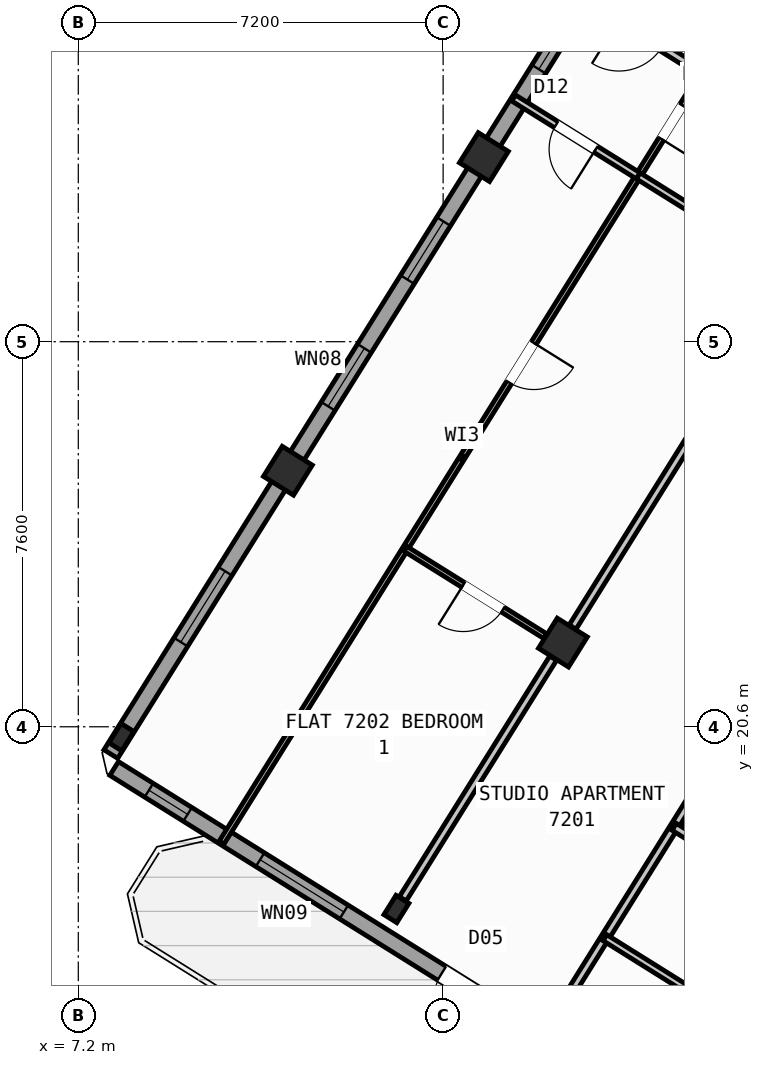
"""IFC4 building model, lengths in metres.
Left out: names, types, materials, properties, quantities, classifications, styles, units other than length and angle.
Written with IfcOpenShell. Run it as: python <this file> out.ifc"""

import sys

from ifc_helpers import new_model, si_unit, direction, frame, frame_2d, origin, origin_2d, place, context, subcontext, project, spatial, rectangle, hollow_rectangle, i_section, extrude, source, transform, mapped, element, fill, save


model = new_model("IFC4")
c1 = context("Model", 3, precision=1e-05, world=origin(), true_north=direction((0.0, 1.0)))
c2 = subcontext(c1, "Body", "Model", "MODEL_VIEW")
j1 = project(units=[si_unit("LENGTHUNIT", "METRE"), si_unit("PLANEANGLEUNIT", "RADIAN")], contexts=[c1])
p1 = place(None, origin())
s1 = spatial("IfcSite", under=j1, at=p1, CompositionType="ELEMENT")
p2 = place(p1, origin())
s2 = spatial("IfcBuilding", under=s1, at=p2, CompositionType="ELEMENT")
p3 = place(p2, frame((0.0, 0.0, 284.4)))
s3 = spatial("IfcBuildingStorey", under=s2, at=p3, CompositionType="ELEMENT", Elevation=284.4)
m1 = source(origin(), c2, "Body", "SweptSolid", [
    extrude(hollow_rectangle(XDim=0.7, YDim=0.7, WallThickness=0.028, at=origin_2d()), origin(), (0.0, 0.0, 1.0), 3.6),
])
p4 = place(p3, frame((16.764, 22.261, 0.0), z_axis=(0.0, 0.0, 1.0), x_axis=(-0.848048096156, 0.529919264233, 0.0)))
e1 = element("IfcColumn", 1, at=p4, inside=s3, PredefinedType="COLUMN", context=c2, shape_type="MappedRepresentation", body=[
    mapped(m1, transform((0.0, 0.0, 0.0), scale=1.0)),
])
m2 = source(origin(), c2, "Body", "SweptSolid", [
    extrude(i_section(OverallWidth=0.3, OverallDepth=0.45, WebThickness=0.014, FlangeThickness=0.026, at=origin_2d()), origin(), (0.0, 0.0, 1.0), 3.6),
])
p5 = place(p3, frame((13.478, 17.003, 0.0), z_axis=(0.0, 0.0, 1.0), x_axis=(-0.848048096156, 0.529919264233, 0.0)))
e2 = element("IfcColumn", 2, at=p5, inside=s3, PredefinedType="COLUMN", context=c2, shape_type="MappedRepresentation", body=[
    mapped(m2, transform((0.0, 0.0, 0.0), scale=1.0)),
])
for number, where, z_axis, x_axis in (
    (3, (15.205, 31.844, 0.0), (0.0, 0.0, 1.0), (-0.848, 0.53, 0.0)),
    (4, (11.336, 25.653, 0.0), (0.0, 0.0, 1.0), (-0.848, 0.53, 0.0)),
):
    element("IfcColumn", number, at=place(p3, frame(where, z_axis=z_axis, x_axis=x_axis)), inside=s3, PredefinedType="COLUMN", context=c2, shape_type="MappedRepresentation", body=[
        mapped(m1, transform((0.0, 0.0, 0.0), scale=1.0)),
    ])
p6 = place(p3, frame((8.051, 20.395, 0.0), z_axis=(0.0, 0.0, 1.0), x_axis=(-0.848048096156, 0.529919264233, 0.0)))
e5 = element("IfcColumn", 5, at=p6, inside=s3, PredefinedType="COLUMN", context=c2, shape_type="MappedRepresentation", body=[
    mapped(m2, transform((0.0, 0.0, 0.0), scale=1.0)),
])
p7 = place(p3, frame((29.268, 6.429, 0.0), z_axis=(0.0, 0.0, 1.0), x_axis=(-0.848048398186, 0.529918780885, 0.0)))
e6 = element("IfcWall", 6, at=p7, inside=s3, PredefinedType="STANDARD", context=c2, shape_type="SweptSolid", body=[
    extrude(rectangle(XDim=25.188, YDim=0.32, at=frame_2d((12.594, 0.0))), origin(), (0.0, 0.0, 1.0), 3.35),
])
p8 = place(p7, frame((16.362, 0.0, 0.0)))
e7 = element("IfcOpeningElement", 7, at=p8, cuts=e6, PredefinedType="OPENING", context=c2, shape_type="SweptSolid", body=[
    extrude(rectangle(XDim=1.2, YDim=2.15, at=frame_2d((0.6, 1.075))), frame((0.0, 0.17, 0.0), z_axis=(0.0, -1.0, 0.0), x_axis=(1.0, 0.0, 0.0)), (0.0, 0.0, 1.0), 0.34),
])
p9 = place(p7, frame((3.859, 0.0, 0.9)))
e8 = element("IfcOpeningElement", 8, at=p9, cuts=e6, PredefinedType="OPENING", context=c2, shape_type="SweptSolid", body=[
    extrude(rectangle(XDim=1.65, YDim=1.45, at=frame_2d((0.825, 0.725))), frame((0.0, 0.17, 0.0), z_axis=(0.0, -1.0, 0.0), x_axis=(1.0, 0.0, 0.0)), (0.0, 0.0, 1.0), 0.34),
])
p10 = place(p7, frame((10.519, 0.0, 0.9)))
e9 = element("IfcOpeningElement", 9, at=p10, cuts=e6, PredefinedType="OPENING", context=c2, shape_type="SweptSolid", body=[
    extrude(rectangle(XDim=1.65, YDim=1.45, at=frame_2d((0.825, 0.725))), frame((0.0, 0.17, 0.0), z_axis=(0.0, -1.0, 0.0), x_axis=(1.0, 0.0, 0.0)), (0.0, 0.0, 1.0), 0.34),
])
p11 = place(p7, frame((19.841, 0.0, 0.95)))
e10 = element("IfcOpeningElement", 10, at=p11, cuts=e6, PredefinedType="OPENING", context=c2, shape_type="SweptSolid", body=[
    extrude(rectangle(XDim=1.95, YDim=1.35, at=frame_2d((0.975, 0.675))), frame((0.0, 0.17, 0.0), z_axis=(0.0, -1.0, 0.0), x_axis=(1.0, 0.0, 0.0)), (0.0, 0.0, 1.0), 0.34),
])
p12 = place(p7, frame((23.478, 0.0, 1.0)))
e11 = element("IfcOpeningElement", 11, at=p12, cuts=e6, PredefinedType="OPENING", context=c2, shape_type="SweptSolid", body=[
    extrude(rectangle(XDim=0.9, YDim=1.25, at=frame_2d((0.45, 0.625))), frame((0.0, 0.17, 0.0), z_axis=(0.0, -1.0, 0.0), x_axis=(1.0, 0.0, 0.0)), (0.0, 0.0, 1.0), 0.34),
])
p13 = place(p3, frame((7.842, 20.061, 0.0), z_axis=(0.0, 0.0, 1.0), x_axis=(0.529915577903, 0.84805039962, 0.0)))
e12 = element("IfcWall", 12, at=p13, inside=s3, PredefinedType="STANDARD", context=c2, shape_type="SweptSolid", body=[
    extrude(rectangle(XDim=21.587, YDim=0.32, at=frame_2d((10.794, 0.0))), origin(), (0.0, 0.0, 1.0), 2.875),
])
p14 = place(p13, frame((2.606, 0.0, 0.9)))
e13 = element("IfcOpeningElement", 13, at=p14, cuts=e12, PredefinedType="OPENING", context=c2, shape_type="SweptSolid", body=[
    extrude(rectangle(XDim=1.65, YDim=1.45, at=frame_2d((0.825, 0.725))), frame((0.0, 0.17, 0.0), z_axis=(0.0, -1.0, 0.0), x_axis=(1.0, 0.0, 0.0)), (0.0, 0.0, 1.0), 0.34),
])
p15 = place(p13, frame((8.094, 0.0, 0.9)))
e14 = element("IfcOpeningElement", 14, at=p15, cuts=e12, PredefinedType="OPENING", context=c2, shape_type="SweptSolid", body=[
    extrude(rectangle(XDim=1.35, YDim=1.45, at=frame_2d((0.675, 0.725))), frame((0.0, 0.17, 0.0), z_axis=(0.0, -1.0, 0.0), x_axis=(1.0, 0.0, 0.0)), (0.0, 0.0, 1.0), 0.34),
])
p16 = place(p13, frame((11.044, 0.0, 0.9)))
e15 = element("IfcOpeningElement", 15, at=p16, cuts=e12, PredefinedType="OPENING", context=c2, shape_type="SweptSolid", body=[
    extrude(rectangle(XDim=1.35, YDim=1.45, at=frame_2d((0.675, 0.725))), frame((0.0, 0.17, 0.0), z_axis=(0.0, -1.0, 0.0), x_axis=(1.0, 0.0, 0.0)), (0.0, 0.0, 1.0), 0.34),
])
p17 = place(p13, frame((15.939, 0.0, 1.0)))
e16 = element("IfcOpeningElement", 16, at=p17, cuts=e12, PredefinedType="OPENING", context=c2, shape_type="SweptSolid", body=[
    extrude(rectangle(XDim=0.9, YDim=1.25, at=frame_2d((0.45, 0.625))), frame((0.0, 0.17, 0.0), z_axis=(0.0, -1.0, 0.0), x_axis=(1.0, 0.0, 0.0)), (0.0, 0.0, 1.0), 0.34),
])
p18 = place(p3, frame((21.206, 17.292, 0.0), z_axis=(0.0, 0.0, 1.0), x_axis=(-0.848050851465, 0.529914854792, 0.0)))
e17 = element("IfcWall", 17, at=p18, inside=s3, PredefinedType="PARTITIONING", context=c2, shape_type="SweptSolid", body=[
    extrude(rectangle(XDim=2.61, YDim=0.16, at=frame_2d((1.305, 0.0))), origin(), (0.0, 0.0, 1.0), 3.34),
])
p19 = place(p3, frame((25.807, 29.582, 0.0), z_axis=(0.0, 0.0, 1.0), x_axis=(-0.529918119251, -0.84804881162, 0.0)))
e18 = element("IfcWall", 18, at=p19, inside=s3, PredefinedType="PARTITIONING", context=c2, shape_type="SweptSolid", body=[
    extrude(rectangle(XDim=17.65, YDim=0.16, at=frame_2d((8.825, 0.0))), origin(), (0.0, 0.0, 1.0), 3.34),
])
p20 = place(p3, frame((26.973, 31.447, 0.0), z_axis=(0.0, 0.0, 1.0), x_axis=(-0.84805406617, 0.529909710094, 0.0)))
e19 = element("IfcWall", 19, at=p20, inside=s3, PredefinedType="PARTITIONING", context=c2, shape_type="SweptSolid", body=[
    extrude(rectangle(XDim=10.33, YDim=0.16, at=frame_2d((5.165, 0.0))), origin(), (0.0, 0.0, 1.0), 3.34),
])
p21 = place(p20, frame((1.459, 0.0, 0.0)))
e20 = element("IfcOpeningElement", 20, at=p21, cuts=e19, PredefinedType="OPENING", context=c2, shape_type="SweptSolid", body=[
    extrude(rectangle(XDim=1.0, YDim=2.1, at=frame_2d((0.5, 1.05))), frame((0.0, 0.09, 0.0), z_axis=(0.0, -1.0, 0.0), x_axis=(1.0, 0.0, 0.0)), (0.0, 0.0, 1.0), 0.18),
])
p22 = place(p20, frame((6.614, 0.0, 0.0)))
e21 = element("IfcOpeningElement", 21, at=p22, cuts=e19, PredefinedType="OPENING", context=c2, shape_type="SweptSolid", body=[
    extrude(rectangle(XDim=1.0, YDim=2.1, at=frame_2d((0.5, 1.05))), frame((0.0, 0.09, 0.0), z_axis=(0.0, -1.0, 0.0), x_axis=(1.0, 0.0, 0.0)), (0.0, 0.0, 1.0), 0.18),
])
p23 = place(p3, frame((25.807, 29.582, 0.0), z_axis=(0.0, 0.0, 1.0), x_axis=(-0.848060702647, 0.529899089097, 0.0)))
e22 = element("IfcWall", 22, at=p23, inside=s3, PredefinedType="PARTITIONING", context=c2, shape_type="SweptSolid", body=[
    extrude(rectangle(XDim=10.33, YDim=0.16, at=frame_2d((5.165, 0.0))), origin(), (0.0, 0.0, 1.0), 3.34),
])
p24 = place(p23, frame((2.22, 0.0, 0.0)))
e23 = element("IfcOpeningElement", 23, at=p24, cuts=e22, PredefinedType="OPENING", context=c2, shape_type="SweptSolid", body=[
    extrude(rectangle(XDim=0.86, YDim=2.05, at=frame_2d((0.43, 1.025))), frame((0.0, 0.09, 0.0), z_axis=(0.0, -1.0, 0.0), x_axis=(1.0, 0.0, 0.0)), (0.0, 0.0, 1.0), 0.18),
])
p25 = place(p23, frame((8.36, 0.0, 0.0)))
e24 = element("IfcOpeningElement", 24, at=p25, cuts=e22, PredefinedType="OPENING", context=c2, shape_type="SweptSolid", body=[
    extrude(rectangle(XDim=1.0, YDim=2.1, at=frame_2d((0.5, 1.05))), frame((0.0, 0.09, 0.0), z_axis=(0.0, -1.0, 0.0), x_axis=(1.0, 0.0, 0.0)), (0.0, 0.0, 1.0), 0.18),
])
p26 = place(p3, frame((20.44, 28.145, 0.0), z_axis=(0.0, 0.0, 1.0), x_axis=(-0.529938869374, -0.84803584519, 0.0)))
e25 = element("IfcWall", 25, at=p26, inside=s3, PredefinedType="PARTITIONING", context=c2, shape_type="SweptSolid", body=[
    extrude(rectangle(XDim=6.576, YDim=0.16, at=frame_2d((3.288, 0.0))), origin(), (0.0, 0.0, 1.0), 2.875),
])
p27 = place(p3, frame((16.572, 21.954, 0.0), z_axis=(0.0, 0.0, 1.0), x_axis=(-0.529904903214, -0.848057069748, 0.0)))
e26 = element("IfcWall", 26, at=p27, inside=s3, PredefinedType="PARTITIONING", context=c2, shape_type="SweptSolid", body=[
    extrude(rectangle(XDim=5.601, YDim=0.16, at=frame_2d((2.801, 0.0))), origin(), (0.0, 0.0, 1.0), 2.875),
])
p28 = place(p3, frame((19.523, 33.508, 0.0), z_axis=(0.0, 0.0, 1.0), x_axis=(-0.529910765222, -0.848053406869, 0.0)))
e27 = element("IfcWall", 27, at=p28, inside=s3, PredefinedType="PARTITIONING", context=c2, shape_type="SweptSolid", body=[
    extrude(rectangle(XDim=17.92, YDim=0.11, at=frame_2d((8.96, 0.0))), origin(), (0.0, 0.0, 1.0), 3.34),
])
p29 = place(p28, frame((0.76, 0.0, 0.0)))
e28 = element("IfcOpeningElement", 28, at=p29, cuts=e27, PredefinedType="OPENING", context=c2, shape_type="SweptSolid", body=[
    extrude(rectangle(XDim=0.78, YDim=2.05, at=frame_2d((0.39, 1.025))), frame((0.0, 0.065, 0.0), z_axis=(0.0, -1.0, 0.0), x_axis=(1.0, 0.0, 0.0)), (0.0, 0.0, 1.0), 0.13),
])
p30 = place(p28, frame((6.289, 0.0, 0.0)))
e29 = element("IfcOpeningElement", 29, at=p30, cuts=e27, PredefinedType="OPENING", context=c2, shape_type="SweptSolid", body=[
    extrude(rectangle(XDim=0.92, YDim=2.08, at=frame_2d((0.46, 1.04))), frame((0.0, 0.065, 0.0), z_axis=(0.0, -1.0, 0.0), x_axis=(1.0, 0.0, 0.0)), (0.0, 0.0, 1.0), 0.13),
])
p31 = place(p3, frame((18.251, 31.473, 0.0), z_axis=(0.0, 0.0, 1.0), x_axis=(-0.848059786386, 0.529900555496, 0.0)))
e30 = element("IfcWall", 30, at=p31, inside=s3, PredefinedType="PLUMBINGWALL", context=c2, shape_type="SweptSolid", body=[
    extrude(rectangle(XDim=2.9, YDim=0.14, at=frame_2d((1.45, 0.0))), origin(), (0.0, 0.0, 1.0), 3.34),
])
p32 = place(p31, frame((0.99, 0.0, 0.0)))
e31 = element("IfcOpeningElement", 31, at=p32, cuts=e30, PredefinedType="OPENING", context=c2, shape_type="SweptSolid", body=[
    extrude(rectangle(XDim=0.92, YDim=2.08, at=frame_2d((0.46, 1.04))), frame((0.0, 0.08, 0.0), z_axis=(0.0, -1.0, 0.0), x_axis=(1.0, 0.0, 0.0)), (0.0, 0.0, 1.0), 0.16),
])
p33 = place(p3, frame((21.321, 29.554, 0.0), z_axis=(0.0, 0.0, 1.0), x_axis=(-0.848021036626, 0.529962566074, 0.0)))
e32 = element("IfcWall", 32, at=p33, inside=s3, PredefinedType="PLUMBINGWALL", context=c2, shape_type="SweptSolid", body=[
    extrude(rectangle(XDim=3.62, YDim=0.14, at=frame_2d((1.81, 0.0))), origin(), (0.0, 0.0, 1.0), 3.34),
])
p34 = place(p3, frame((16.416, 22.388, 0.0), z_axis=(0.0, 0.0, 1.0), x_axis=(-0.84806986598, 0.529884423641, 0.0)))
e33 = element("IfcWall", 33, at=p34, inside=s3, PredefinedType="PARTITIONING", context=c2, shape_type="SweptSolid", body=[
    extrude(rectangle(XDim=3.258, YDim=0.11, at=frame_2d((1.629, 0.0))), origin(), (0.0, 0.0, 1.0), 2.875),
])
p35 = place(p34, frame((0.988, 0.0, 0.0)))
e34 = element("IfcOpeningElement", 34, at=p35, cuts=e33, PredefinedType="OPENING", context=c2, shape_type="SweptSolid", body=[
    extrude(rectangle(XDim=0.92, YDim=2.08, at=frame_2d((0.46, 1.04))), frame((0.0, 0.065, 0.0), z_axis=(0.0, -1.0, 0.0), x_axis=(1.0, 0.0, 0.0)), (0.0, 0.0, 1.0), 0.13),
])
p36 = place(p3, frame((32.164, 10.374, 0.0), z_axis=(0.0, 0.0, 1.0), x_axis=(-0.848044107957, 0.529925646633, 0.0)))
e35 = element("IfcWall", 35, at=p36, inside=s3, PredefinedType="PARTITIONING", context=c2, shape_type="SweptSolid", body=[
    extrude(rectangle(XDim=15.57, YDim=0.16, at=frame_2d((7.785, 0.0))), origin(), (0.0, 0.0, 1.0), 3.34),
])
p37 = place(p36, frame((10.83, 0.0, 0.0)))
e36 = element("IfcOpeningElement", 36, at=p37, cuts=e35, PredefinedType="OPENING", context=c2, shape_type="SweptSolid", body=[
    extrude(rectangle(XDim=1.0, YDim=2.1, at=frame_2d((0.5, 1.05))), frame((0.0, 0.09, 0.0), z_axis=(0.0, -1.0, 0.0), x_axis=(1.0, 0.0, 0.0)), (0.0, 0.0, 1.0), 0.18),
])
p38 = place(p3, frame((29.72, 8.859, 0.0), z_axis=(0.0, 0.0, 1.0), x_axis=(-0.848049134363, 0.529917602752, 0.0)))
e37 = element("IfcWall", 37, at=p38, inside=s3, PredefinedType="PLUMBINGWALL", context=c2, shape_type="SweptSolid", body=[
    extrude(rectangle(XDim=14.3, YDim=0.14, at=frame_2d((7.15, 0.0))), origin(), (0.0, 0.0, 1.0), 3.34),
])
p39 = place(p38, frame((9.57, 0.0, 0.0)))
e38 = element("IfcOpeningElement", 38, at=p39, cuts=e37, PredefinedType="OPENING", context=c2, shape_type="SweptSolid", body=[
    extrude(rectangle(XDim=0.92, YDim=2.08, at=frame_2d((0.46, 1.04))), frame((0.0, 0.08, 0.0), z_axis=(0.0, -1.0, 0.0), x_axis=(1.0, 0.0, 0.0)), (0.0, 0.0, 1.0), 0.16),
])
m3 = source(origin(), c2, "Body", "SweptSolid", [
    extrude(rectangle(XDim=1.2, YDim=2.15, at=frame_2d((0.6, 1.075))), frame((0.0, 0.025, 0.0), z_axis=(0.0, -1.0, 0.0), x_axis=(1.0, 0.0, 0.0)), (0.0, 0.0, 1.0), 0.05),
])
p40 = place(p8, origin())
e39 = element("IfcDoor", 39, at=p40, inside=s3, OperationType="SINGLE_SWING_LEFT", PredefinedType="DOOR", context=c2, shape_type="MappedRepresentation", body=[
    mapped(m3, transform((0.0, 0.0, 0.0), scale=1.0)),
])
fill(e7, e39)
m4 = source(origin(), c2, "Body", "SweptSolid", [
    extrude(rectangle(XDim=1.95, YDim=1.35, at=frame_2d((0.975, 0.675))), frame((0.0, 0.03, 0.0), z_axis=(0.0, -1.0, 0.0), x_axis=(1.0, 0.0, 0.0)), (0.0, 0.0, 1.0), 0.06),
])
p41 = place(p11, origin())
e40 = element("IfcWindow", 40, at=p41, inside=s3, PartitioningType="SINGLE_PANEL", PredefinedType="WINDOW", context=c2, shape_type="MappedRepresentation", body=[
    mapped(m4, transform((0.0, 0.0, 0.0), scale=1.0)),
])
fill(e10, e40)
m5 = source(origin(), c2, "Body", "SweptSolid", [
    extrude(rectangle(XDim=0.9, YDim=1.25, at=frame_2d((0.45, 0.625))), frame((0.0, 0.03, 0.0), z_axis=(0.0, -1.0, 0.0), x_axis=(1.0, 0.0, 0.0)), (0.0, 0.0, 1.0), 0.06),
])
p42 = place(p12, origin())
e41 = element("IfcWindow", 41, at=p42, inside=s3, PartitioningType="SINGLE_PANEL", PredefinedType="WINDOW", context=c2, shape_type="MappedRepresentation", body=[
    mapped(m5, transform((0.0, 0.0, 0.0), scale=1.0)),
])
fill(e11, e41)
m6 = source(origin(), c2, "Body", "SweptSolid", [
    extrude(rectangle(XDim=1.65, YDim=1.45, at=frame_2d((0.825, 0.725))), frame((0.0, 0.03, 0.0), z_axis=(0.0, -1.0, 0.0), x_axis=(1.0, 0.0, 0.0)), (0.0, 0.0, 1.0), 0.06),
])
p43 = place(p14, origin())
e42 = element("IfcWindow", 42, at=p43, inside=s3, PartitioningType="SINGLE_PANEL", PredefinedType="WINDOW", context=c2, shape_type="MappedRepresentation", body=[
    mapped(m6, transform((0.0, 0.0, 0.0), scale=1.0)),
])
fill(e13, e42)
m7 = source(origin(), c2, "Body", "SweptSolid", [
    extrude(rectangle(XDim=1.35, YDim=1.45, at=frame_2d((0.675, 0.725))), frame((0.0, 0.03, 0.0), z_axis=(0.0, -1.0, 0.0), x_axis=(1.0, 0.0, 0.0)), (0.0, 0.0, 1.0), 0.06),
])
p44 = place(p15, origin())
e43 = element("IfcWindow", 43, at=p44, inside=s3, PartitioningType="SINGLE_PANEL", PredefinedType="WINDOW", context=c2, shape_type="MappedRepresentation", body=[
    mapped(m7, transform((0.0, 0.0, 0.0), scale=1.0)),
])
fill(e14, e43)
p45 = place(p16, origin())
e44 = element("IfcWindow", 44, at=p45, inside=s3, PartitioningType="SINGLE_PANEL", PredefinedType="WINDOW", context=c2, shape_type="MappedRepresentation", body=[
    mapped(m7, transform((0.0, 0.0, 0.0), scale=1.0)),
])
fill(e15, e44)
p46 = place(p17, origin())
e45 = element("IfcWindow", 45, at=p46, inside=s3, PartitioningType="SINGLE_PANEL", PredefinedType="WINDOW", context=c2, shape_type="MappedRepresentation", body=[
    mapped(m5, transform((0.0, 0.0, 0.0), scale=1.0)),
])
fill(e16, e45)
m8 = source(origin(), c2, "Body", "SweptSolid", [
    extrude(rectangle(XDim=0.92, YDim=2.08, at=frame_2d((0.46, 1.04))), frame((0.0, 0.025, 0.0), z_axis=(0.0, -1.0, 0.0), x_axis=(1.0, 0.0, 0.0)), (0.0, 0.0, 1.0), 0.05),
])
p47 = place(p32, origin())
e46 = element("IfcDoor", 46, at=p47, inside=s3, OperationType="SINGLE_SWING_LEFT", PredefinedType="DOOR", context=c2, shape_type="MappedRepresentation", body=[
    mapped(m8, transform((0.0, 0.0, 0.0), scale=1.0)),
])
fill(e31, e46)
m9 = source(origin(), c2, "Body", "SweptSolid", [
    extrude(rectangle(XDim=0.78, YDim=2.05, at=frame_2d((0.39, 1.025))), frame((0.0, 0.025, 0.0), z_axis=(0.0, -1.0, 0.0), x_axis=(1.0, 0.0, 0.0)), (0.0, 0.0, 1.0), 0.05),
])
p48 = place(p29, origin())
e47 = element("IfcDoor", 47, at=p48, inside=s3, OperationType="SINGLE_SWING_RIGHT", PredefinedType="DOOR", context=c2, shape_type="MappedRepresentation", body=[
    mapped(m9, transform((0.0, 0.0, 0.0), scale=1.0)),
])
fill(e28, e47)
p49 = place(p30, origin())
e48 = element("IfcDoor", 48, at=p49, inside=s3, OperationType="SINGLE_SWING_LEFT", PredefinedType="DOOR", context=c2, shape_type="MappedRepresentation", body=[
    mapped(m8, transform((0.0, 0.0, 0.0), scale=1.0)),
])
fill(e29, e48)
p50 = place(p35, origin())
e49 = element("IfcDoor", 49, at=p50, inside=s3, OperationType="SINGLE_SWING_RIGHT", PredefinedType="DOOR", context=c2, shape_type="MappedRepresentation", body=[
    mapped(m8, transform((0.0, 0.0, 0.0), scale=1.0)),
])
fill(e34, e49)
save(model, sys.argv[1])
